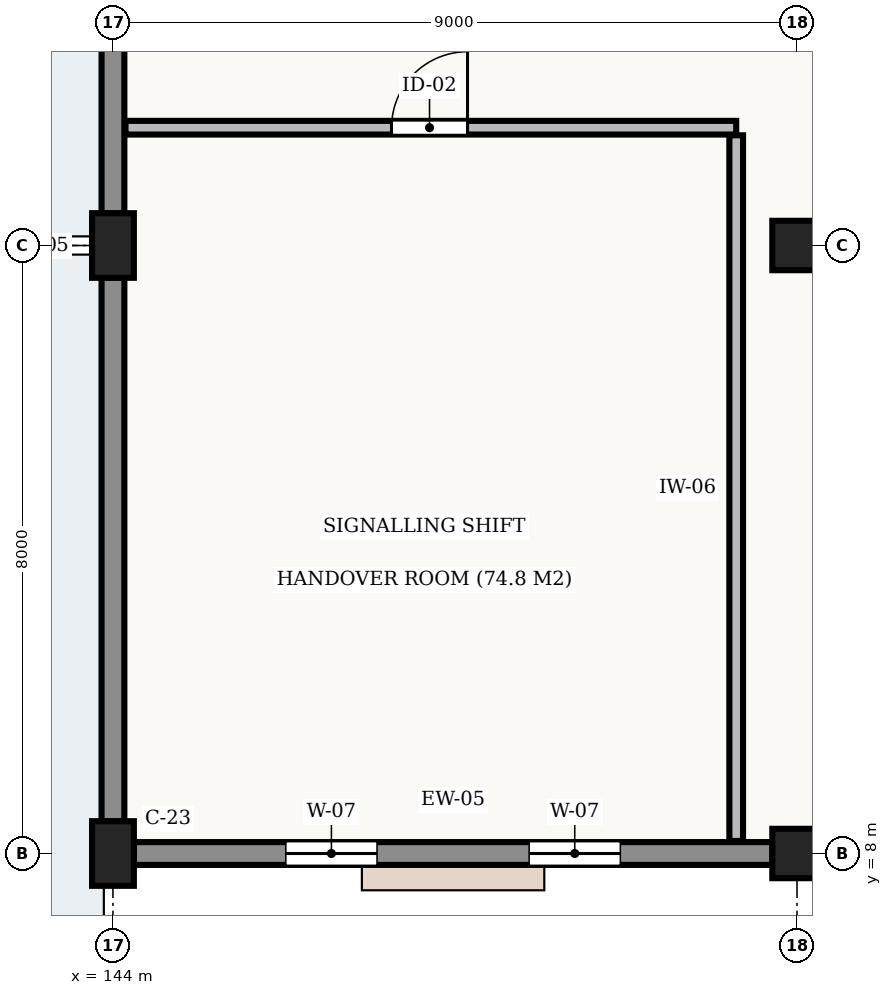
"""IFC4 building model, lengths in metres.
Left out: names, types, materials, properties, quantities, classifications, styles, units other than length and angle.
Written with IfcOpenShell. Run it as: python <this file> out.ifc"""

import sys

from ifc_helpers import new_model, si_unit, direction, frame, frame_2d, origin, origin_2d, place, context, subcontext, project, spatial, rectangle, extrude, element, fill, save


model = new_model("IFC4")
c1 = context("Model", 3, precision=1e-05, world=origin(), true_north=direction((0.0, 1.0)))
c2 = subcontext(c1, "Body", "Model", "MODEL_VIEW")
j1 = project(units=[si_unit("LENGTHUNIT", "METRE"), si_unit("PLANEANGLEUNIT", "RADIAN")], contexts=[c1])
p1 = place(None, origin())
s1 = spatial("IfcSite", under=j1, at=p1, CompositionType="ELEMENT")
p2 = place(p1, origin())
s2 = spatial("IfcBuilding", under=s1, at=p2, CompositionType="ELEMENT")
p3 = place(p2, frame((0.0, 0.0, 18.6)))
s3 = spatial("IfcBuildingStorey", under=s2, at=p3, CompositionType="ELEMENT", Elevation=18.6)
for number, where, z_axis, x_axis in (
    (1, (144.0, 8.0, 0.0), (0.0, 0.0, 1.0), (1.0, 0.0, 0.0)),
    (2, (144.0, 16.0, 0.0), (0.0, 0.0, 1.0), (1.0, 0.0, 0.0)),
):
    element("IfcColumn", number, at=place(p3, frame(where, z_axis=z_axis, x_axis=x_axis)), inside=s3, PredefinedType="COLUMN", context=c2, shape_type="SweptSolid", body=[
        extrude(rectangle(XDim=0.55, YDim=0.85, at=origin_2d()), origin(), (0.0, 0.0, 1.0), 4.2),
    ])
for number, where, z_axis, x_axis in (
    (3, (153.0, 8.0, 0.0), (0.0, 0.0, 1.0), (1.0, 0.0, 0.0)),
    (4, (153.0, 16.0, 0.0), (0.0, 0.0, 1.0), (1.0, 0.0, 0.0)),
):
    element("IfcColumn", number, at=place(p3, frame(where, z_axis=z_axis, x_axis=x_axis)), inside=s3, PredefinedType="COLUMN", context=c2, shape_type="SweptSolid", body=[
        extrude(rectangle(XDim=0.65, YDim=0.65, at=origin_2d()), origin(), (0.0, 0.0, 1.0), 4.2),
    ])
p4 = place(p3, frame((152.677, 8.0, 0.0), z_axis=(0.0, 0.0, 1.0), x_axis=(-1.0, 0.0, 0.0)))
e5 = element("IfcWall", 5, at=p4, inside=s3, PredefinedType="STANDARD", context=c2, shape_type="SweptSolid", body=[
    extrude(rectangle(XDim=8.404, YDim=0.3, at=frame_2d((4.202, 0.0))), origin(), (0.0, 0.0, 1.0), 3.39),
])
p5 = place(p4, frame((2.001, 0.0, 0.7)))
e6 = element("IfcOpeningElement", 6, at=p5, cuts=e5, PredefinedType="OPENING", context=c2, shape_type="SweptSolid", body=[
    extrude(rectangle(XDim=1.2, YDim=1.8, at=frame_2d((0.6, 0.9))), frame((0.0, 0.162, 0.0), z_axis=(0.0, -1.0, 0.0), x_axis=(1.0, 0.0, 0.0)), (0.0, 0.0, 1.0), 0.324),
])
p6 = place(p4, frame((5.203, 0.0, 0.7)))
e7 = element("IfcOpeningElement", 7, at=p6, cuts=e5, PredefinedType="OPENING", context=c2, shape_type="SweptSolid", body=[
    extrude(rectangle(XDim=1.2, YDim=1.8, at=frame_2d((0.6, 0.9))), frame((0.0, 0.162, 0.0), z_axis=(0.0, -1.0, 0.0), x_axis=(1.0, 0.0, 0.0)), (0.0, 0.0, 1.0), 0.324),
])
p7 = place(p3, frame((144.0, 8.423, 0.0), z_axis=(0.0, 0.0, 1.0), x_axis=(0.0, 1.0, 0.0)))
e8 = element("IfcWall", 8, at=p7, inside=s3, PredefinedType="STANDARD", context=c2, shape_type="SweptSolid", body=[
    extrude(rectangle(XDim=7.154, YDim=0.3, at=frame_2d((3.577, 0.0))), origin(), (0.0, 0.0, 1.0), 3.44),
])
p8 = place(p3, frame((144.0, 16.423, 0.0), z_axis=(0.0, 0.0, 1.0), x_axis=(0.0, 1.0, 0.0)))
e9 = element("IfcWall", 9, at=p8, inside=s3, PredefinedType="STANDARD", context=c2, shape_type="SweptSolid", body=[
    extrude(rectangle(XDim=7.154, YDim=0.3, at=frame_2d((3.577, 0.0))), origin(), (0.0, 0.0, 1.0), 3.39),
])
p9 = place(p3, frame((144.165, 17.55, 0.0), z_axis=(0.0, 0.0, 1.0), x_axis=(1.0, 0.0, 0.0)))
e10 = element("IfcWall", 10, at=p9, inside=s3, PredefinedType="STANDARD", context=c2, shape_type="SweptSolid", body=[
    extrude(rectangle(XDim=8.035, YDim=0.18, at=frame_2d((4.018, 0.0))), origin(), (0.0, 0.0, 1.0), 3.91),
])
p10 = place(p9, frame((3.5, 0.0, 0.0)))
e11 = element("IfcOpeningElement", 11, at=p10, cuts=e10, PredefinedType="OPENING", context=c2, shape_type="SweptSolid", body=[
    extrude(rectangle(XDim=1.0, YDim=2.1, at=frame_2d((0.5, 1.05))), frame((0.0, 0.102, 0.0), z_axis=(0.0, -1.0, 0.0), x_axis=(1.0, 0.0, 0.0)), (0.0, 0.0, 1.0), 0.204),
])
p11 = place(p3, frame((152.2, 8.165, 0.0), z_axis=(0.0, 0.0, 1.0), x_axis=(0.0, 1.0, 0.0)))
e12 = element("IfcWall", 12, at=p11, inside=s3, PredefinedType="STANDARD", context=c2, shape_type="SweptSolid", body=[
    extrude(rectangle(XDim=9.285, YDim=0.18, at=frame_2d((4.643, 0.0))), origin(), (0.0, 0.0, 1.0), 3.91),
])
p12 = place(p5, origin())
e13 = element("IfcWindow", 13, at=p12, inside=s3, PartitioningType="SINGLE_PANEL", PredefinedType="WINDOW", context=c2, shape_type="SweptSolid", body=[
    extrude(rectangle(XDim=1.2, YDim=1.8, at=frame_2d((0.6, 0.9))), frame((0.0, 0.03, 0.0), z_axis=(0.0, -1.0, 0.0), x_axis=(1.0, 0.0, 0.0)), (0.0, 0.0, 1.0), 0.06),
])
fill(e6, e13)
p13 = place(p6, origin())
e14 = element("IfcWindow", 14, at=p13, inside=s3, PartitioningType="SINGLE_PANEL", PredefinedType="WINDOW", context=c2, shape_type="SweptSolid", body=[
    extrude(rectangle(XDim=1.2, YDim=1.8, at=frame_2d((0.6, 0.9))), frame((0.0, 0.03, 0.0), z_axis=(0.0, -1.0, 0.0), x_axis=(1.0, 0.0, 0.0)), (0.0, 0.0, 1.0), 0.06),
])
fill(e7, e14)
p14 = place(p10, origin())
e15 = element("IfcDoor", 15, at=p14, inside=s3, OperationType="SINGLE_SWING_RIGHT", PredefinedType="DOOR", context=c2, shape_type="SweptSolid", body=[
    extrude(rectangle(XDim=1.0, YDim=2.1, at=frame_2d((0.5, 1.05))), frame((0.0, 0.025, 0.0), z_axis=(0.0, -1.0, 0.0), x_axis=(1.0, 0.0, 0.0)), (0.0, 0.0, 1.0), 0.05),
])
fill(e11, e15)
save(model, sys.argv[1])
